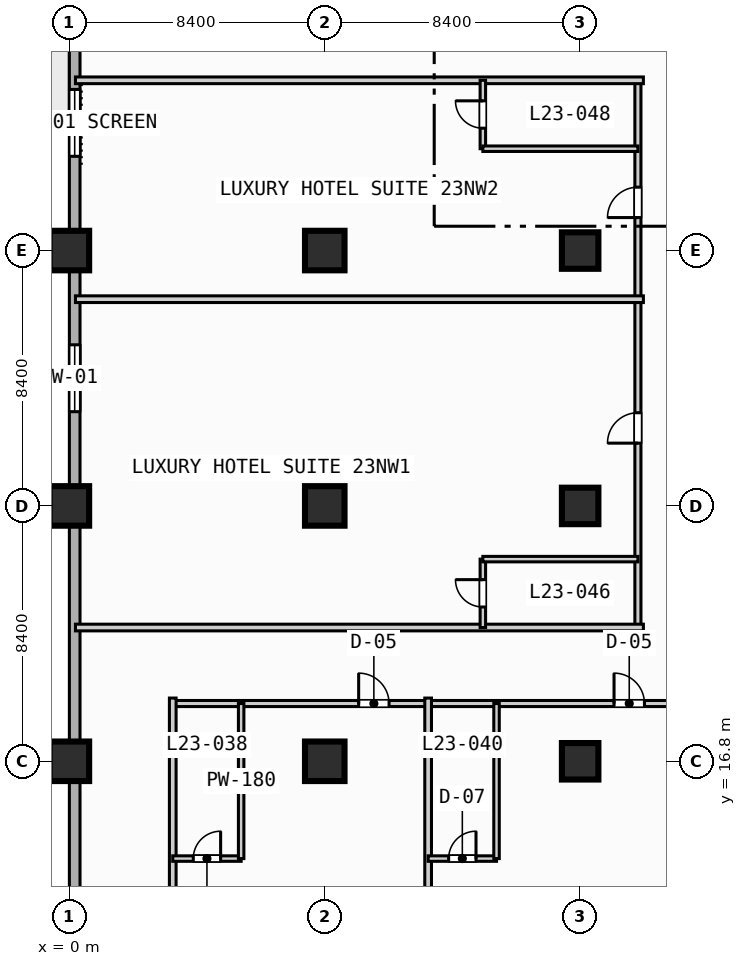
"""IFC4 building model, lengths in metres.
Left out: names, types, materials, properties, quantities, classifications, styles, units other than length and angle.
Written with IfcOpenShell. Run it as: python <this file> out.ifc"""

import sys

from ifc_helpers import new_model, si_unit, direction, frame, frame_2d, origin, origin_2d, place, context, subcontext, project, spatial, rectangle, extrude, element, fill, save


model = new_model("IFC4")
c1 = context("Model", 3, precision=1e-05, world=origin(), true_north=direction((0.0, 1.0)))
c2 = subcontext(c1, "Body", "Model", "MODEL_VIEW")
j1 = project(units=[si_unit("LENGTHUNIT", "METRE"), si_unit("PLANEANGLEUNIT", "RADIAN")], contexts=[c1])
p1 = place(None, origin())
s1 = spatial("IfcSite", under=j1, at=p1, CompositionType="ELEMENT")
p2 = place(p1, origin())
s2 = spatial("IfcBuilding", under=s1, at=p2, CompositionType="ELEMENT")
p3 = place(p2, frame((0.0, 0.0, 100.0)))
s3 = spatial("IfcBuildingStorey", under=s2, at=p3, CompositionType="ELEMENT", Elevation=100.0)
for number, where, z_axis, x_axis in (
    (1, (0.0, 16.8, 0.0), (0.0, 0.0, 1.0), (1.0, 0.0, 0.0)),
    (2, (0.0, 25.2, 0.0), (0.0, 0.0, 1.0), (1.0, 0.0, 0.0)),
    (3, (0.0, 33.6, 0.0), (0.0, 0.0, 1.0), (1.0, 0.0, 0.0)),
    (4, (8.4, 16.8, 0.0), (0.0, 0.0, 1.0), (1.0, 0.0, 0.0)),
    (5, (8.4, 25.2, 0.0), (0.0, 0.0, 1.0), (1.0, 0.0, 0.0)),
    (6, (8.4, 33.6, 0.0), (0.0, 0.0, 1.0), (1.0, 0.0, 0.0)),
):
    element("IfcColumn", number, at=place(p3, frame(where, z_axis=z_axis, x_axis=x_axis)), inside=s3, PredefinedType="COLUMN", context=c2, shape_type="SweptSolid", body=[
        extrude(rectangle(XDim=1.3, YDim=1.3, at=origin_2d()), origin(), (0.0, 0.0, 1.0), 3.8),
    ])
for number, where, z_axis, x_axis in (
    (7, (16.8, 16.8, 0.0), (0.0, 0.0, 1.0), (1.0, 0.0, 0.0)),
    (8, (16.8, 25.2, 0.0), (0.0, 0.0, 1.0), (1.0, 0.0, 0.0)),
    (9, (16.8, 33.6, 0.0), (0.0, 0.0, 1.0), (1.0, 0.0, 0.0)),
):
    element("IfcColumn", number, at=place(p3, frame(where, z_axis=z_axis, x_axis=x_axis)), inside=s3, PredefinedType="COLUMN", context=c2, shape_type="SweptSolid", body=[
        extrude(rectangle(XDim=1.2, YDim=1.2, at=origin_2d()), origin(), (0.0, 0.0, 1.0), 3.8),
    ])
p4 = place(p3, frame((0.175, 3.175, 0.0), z_axis=(0.0, 0.0, 1.0), x_axis=(0.0, 1.0, 0.0)))
e10 = element("IfcWall", 10, at=p4, inside=s3, PredefinedType="STANDARD", context=c2, shape_type="SweptSolid", body=[
    extrude(rectangle(XDim=86.05, YDim=0.35, at=frame_2d((43.025, 0.0))), origin(), (0.0, 0.0, 1.0), 3.55),
])
p5 = place(p4, frame((42.325, 0.0, 0.0)))
e11 = element("IfcOpeningElement", 11, at=p5, cuts=e10, PredefinedType="OPENING", context=c2, shape_type="SweptSolid", body=[
    extrude(rectangle(XDim=1.4, YDim=2.2, at=frame_2d((0.7, 1.1))), frame((0.0, 0.185, 0.0), z_axis=(0.0, -1.0, 0.0), x_axis=(1.0, 0.0, 0.0)), (0.0, 0.0, 1.0), 0.37),
])
p6 = place(p4, frame((25.125, 0.0, 0.85)))
e12 = element("IfcOpeningElement", 12, at=p6, cuts=e10, PredefinedType="OPENING", context=c2, shape_type="SweptSolid", body=[
    extrude(rectangle(XDim=2.2, YDim=1.8, at=frame_2d((1.1, 0.9))), frame((0.0, 0.185, 0.0), z_axis=(0.0, -1.0, 0.0), x_axis=(1.0, 0.0, 0.0)), (0.0, 0.0, 1.0), 0.37),
])
p7 = place(p4, frame((33.525, 0.0, 0.85)))
e13 = element("IfcOpeningElement", 13, at=p7, cuts=e10, PredefinedType="OPENING", context=c2, shape_type="SweptSolid", body=[
    extrude(rectangle(XDim=2.2, YDim=1.8, at=frame_2d((1.1, 0.9))), frame((0.0, 0.185, 0.0), z_axis=(0.0, -1.0, 0.0), x_axis=(1.0, 0.0, 0.0)), (0.0, 0.0, 1.0), 0.37),
])
p8 = place(p4, frame((58.725, 0.0, 0.85)))
e14 = element("IfcOpeningElement", 14, at=p8, cuts=e10, PredefinedType="OPENING", context=c2, shape_type="SweptSolid", body=[
    extrude(rectangle(XDim=2.2, YDim=1.8, at=frame_2d((1.1, 0.9))), frame((0.0, 0.185, 0.0), z_axis=(0.0, -1.0, 0.0), x_axis=(1.0, 0.0, 0.0)), (0.0, 0.0, 1.0), 0.37),
])
p9 = place(p4, frame((65.125, 0.0, 0.85)))
e15 = element("IfcOpeningElement", 15, at=p9, cuts=e10, PredefinedType="OPENING", context=c2, shape_type="SweptSolid", body=[
    extrude(rectangle(XDim=1.8, YDim=1.8, at=frame_2d((0.9, 0.9))), frame((0.0, 0.185, 0.0), z_axis=(0.0, -1.0, 0.0), x_axis=(1.0, 0.0, 0.0)), (0.0, 0.0, 1.0), 0.37),
])
p10 = place(p4, frame((73.275, 0.0, 0.85)))
e16 = element("IfcOpeningElement", 16, at=p10, cuts=e10, PredefinedType="OPENING", context=c2, shape_type="SweptSolid", body=[
    extrude(rectangle(XDim=1.8, YDim=1.8, at=frame_2d((0.9, 0.9))), frame((0.0, 0.185, 0.0), z_axis=(0.0, -1.0, 0.0), x_axis=(1.0, 0.0, 0.0)), (0.0, 0.0, 1.0), 0.37),
])
p11 = place(p4, frame((81.625, 0.0, 0.85)))
e17 = element("IfcOpeningElement", 17, at=p11, cuts=e10, PredefinedType="OPENING", context=c2, shape_type="SweptSolid", body=[
    extrude(rectangle(XDim=1.8, YDim=1.8, at=frame_2d((0.9, 0.9))), frame((0.0, 0.185, 0.0), z_axis=(0.0, -1.0, 0.0), x_axis=(1.0, 0.0, 0.0)), (0.0, 0.0, 1.0), 0.37),
])
p12 = place(p3, frame((3.4, 18.7, 0.0), z_axis=(0.0, 0.0, 1.0), x_axis=(1.0, 0.0, 0.0)))
e18 = element("IfcWall", 18, at=p12, inside=s3, PredefinedType="PARTITIONING", context=c2, shape_type="SweptSolid", body=[
    extrude(rectangle(XDim=35.8, YDim=0.2, at=frame_2d((17.9, 0.0))), origin(), (0.0, 0.0, 1.0), 3.55),
])
p13 = place(p12, frame((6.115, 0.0, 0.0)))
e19 = element("IfcOpeningElement", 19, at=p13, cuts=e18, PredefinedType="OPENING", context=c2, shape_type="SweptSolid", body=[
    extrude(rectangle(XDim=1.0, YDim=2.15, at=frame_2d((0.5, 1.075))), frame((0.0, 0.11, 0.0), z_axis=(0.0, -1.0, 0.0), x_axis=(1.0, 0.0, 0.0)), (0.0, 0.0, 1.0), 0.22),
])
p14 = place(p12, frame((14.515, 0.0, 0.0)))
e20 = element("IfcOpeningElement", 20, at=p14, cuts=e18, PredefinedType="OPENING", context=c2, shape_type="SweptSolid", body=[
    extrude(rectangle(XDim=1.0, YDim=2.15, at=frame_2d((0.5, 1.075))), frame((0.0, 0.11, 0.0), z_axis=(0.0, -1.0, 0.0), x_axis=(1.0, 0.0, 0.0)), (0.0, 0.0, 1.0), 0.22),
])
p15 = place(p12, frame((22.915, 0.0, 0.0)))
e21 = element("IfcOpeningElement", 21, at=p15, cuts=e18, PredefinedType="OPENING", context=c2, shape_type="SweptSolid", body=[
    extrude(rectangle(XDim=1.0, YDim=2.15, at=frame_2d((0.5, 1.075))), frame((0.0, 0.11, 0.0), z_axis=(0.0, -1.0, 0.0), x_axis=(1.0, 0.0, 0.0)), (0.0, 0.0, 1.0), 0.22),
])
p16 = place(p12, frame((31.165, 0.0, 0.0)))
e22 = element("IfcOpeningElement", 22, at=p16, cuts=e18, PredefinedType="OPENING", context=c2, shape_type="SweptSolid", body=[
    extrude(rectangle(XDim=1.0, YDim=2.15, at=frame_2d((0.5, 1.075))), frame((0.0, 0.11, 0.0), z_axis=(0.0, -1.0, 0.0), x_axis=(1.0, 0.0, 0.0)), (0.0, 0.0, 1.0), 0.22),
])
p17 = place(p3, frame((3.4, 0.2, 0.0), z_axis=(0.0, 0.0, 1.0), x_axis=(0.0, 1.0, 0.0)))
e23 = element("IfcWall", 23, at=p17, inside=s3, PredefinedType="PARTITIONING", context=c2, shape_type="SweptSolid", body=[
    extrude(rectangle(XDim=18.68, YDim=0.22, at=frame_2d((9.34, 0.0))), origin(), (0.0, 0.0, 1.0), 3.55),
])
p18 = place(p3, frame((3.4, 13.6, 0.0), z_axis=(0.0, 0.0, 1.0), x_axis=(1.0, 0.0, 0.0)))
e24 = element("IfcWall", 24, at=p18, inside=s3, PredefinedType="PLUMBINGWALL", context=c2, shape_type="SweptSolid", body=[
    extrude(rectangle(XDim=2.25, YDim=0.18, at=frame_2d((1.125, 0.0))), origin(), (0.0, 0.0, 1.0), 3.55),
])
p19 = place(p18, frame((0.675, 0.0, 0.0)))
e25 = element("IfcOpeningElement", 25, at=p19, cuts=e24, PredefinedType="OPENING", context=c2, shape_type="SweptSolid", body=[
    extrude(rectangle(XDim=0.9, YDim=2.1, at=frame_2d((0.45, 1.05))), frame((0.0, 0.1, 0.0), z_axis=(0.0, -1.0, 0.0), x_axis=(1.0, 0.0, 0.0)), (0.0, 0.0, 1.0), 0.2),
])
p20 = place(p3, frame((5.65, 13.6, 0.0), z_axis=(0.0, 0.0, 1.0), x_axis=(0.0, 1.0, 0.0)))
e26 = element("IfcWall", 26, at=p20, inside=s3, PredefinedType="PLUMBINGWALL", context=c2, shape_type="SweptSolid", body=[
    extrude(rectangle(XDim=5.1, YDim=0.18, at=frame_2d((2.55, 0.0))), origin(), (0.0, 0.0, 1.0), 3.55),
])
p21 = place(p3, frame((11.8, 0.2, 0.0), z_axis=(0.0, 0.0, 1.0), x_axis=(0.0, 1.0, 0.0)))
e27 = element("IfcWall", 27, at=p21, inside=s3, PredefinedType="PARTITIONING", context=c2, shape_type="SweptSolid", body=[
    extrude(rectangle(XDim=18.68, YDim=0.22, at=frame_2d((9.34, 0.0))), origin(), (0.0, 0.0, 1.0), 3.55),
])
p22 = place(p3, frame((11.8, 13.6, 0.0), z_axis=(0.0, 0.0, 1.0), x_axis=(1.0, 0.0, 0.0)))
e28 = element("IfcWall", 28, at=p22, inside=s3, PredefinedType="PLUMBINGWALL", context=c2, shape_type="SweptSolid", body=[
    extrude(rectangle(XDim=2.25, YDim=0.18, at=frame_2d((1.125, 0.0))), origin(), (0.0, 0.0, 1.0), 3.55),
])
p23 = place(p22, frame((0.675, 0.0, 0.0)))
e29 = element("IfcOpeningElement", 29, at=p23, cuts=e28, PredefinedType="OPENING", context=c2, shape_type="SweptSolid", body=[
    extrude(rectangle(XDim=0.9, YDim=2.1, at=frame_2d((0.45, 1.05))), frame((0.0, 0.1, 0.0), z_axis=(0.0, -1.0, 0.0), x_axis=(1.0, 0.0, 0.0)), (0.0, 0.0, 1.0), 0.2),
])
p24 = place(p3, frame((14.05, 13.6, 0.0), z_axis=(0.0, 0.0, 1.0), x_axis=(0.0, 1.0, 0.0)))
e30 = element("IfcWall", 30, at=p24, inside=s3, PredefinedType="PLUMBINGWALL", context=c2, shape_type="SweptSolid", body=[
    extrude(rectangle(XDim=5.1, YDim=0.18, at=frame_2d((2.55, 0.0))), origin(), (0.0, 0.0, 1.0), 3.55),
])
p25 = place(p3, frame((18.7, 21.2, 0.0), z_axis=(0.0, 0.0, 1.0), x_axis=(0.0, 1.0, 0.0)))
e31 = element("IfcWall", 31, at=p25, inside=s3, PredefinedType="PARTITIONING", context=c2, shape_type="SweptSolid", body=[
    extrude(rectangle(XDim=18.0, YDim=0.2, at=frame_2d((9.0, 0.0))), origin(), (0.0, 0.0, 1.0), 3.55),
])
p26 = place(p25, frame((6.065, 0.0, 0.0)))
e32 = element("IfcOpeningElement", 32, at=p26, cuts=e31, PredefinedType="OPENING", context=c2, shape_type="SweptSolid", body=[
    extrude(rectangle(XDim=1.0, YDim=2.15, at=frame_2d((0.5, 1.075))), frame((0.0, 0.11, 0.0), z_axis=(0.0, -1.0, 0.0), x_axis=(1.0, 0.0, 0.0)), (0.0, 0.0, 1.0), 0.22),
])
p27 = place(p25, frame((13.485, 0.0, 0.0)))
e33 = element("IfcOpeningElement", 33, at=p27, cuts=e31, PredefinedType="OPENING", context=c2, shape_type="SweptSolid", body=[
    extrude(rectangle(XDim=1.0, YDim=2.15, at=frame_2d((0.5, 1.075))), frame((0.0, 0.11, 0.0), z_axis=(0.0, -1.0, 0.0), x_axis=(1.0, 0.0, 0.0)), (0.0, 0.0, 1.0), 0.22),
])
p28 = place(p3, frame((0.2, 21.2, 0.0), z_axis=(0.0, 0.0, 1.0), x_axis=(1.0, 0.0, 0.0)))
e34 = element("IfcWall", 34, at=p28, inside=s3, PredefinedType="PARTITIONING", context=c2, shape_type="SweptSolid", body=[
    extrude(rectangle(XDim=18.68, YDim=0.22, at=frame_2d((9.34, 0.0))), origin(), (0.0, 0.0, 1.0), 3.55),
])
p29 = place(p3, frame((13.6, 21.2, 0.0), z_axis=(0.0, 0.0, 1.0), x_axis=(0.0, 1.0, 0.0)))
e35 = element("IfcWall", 35, at=p29, inside=s3, PredefinedType="PLUMBINGWALL", context=c2, shape_type="SweptSolid", body=[
    extrude(rectangle(XDim=2.25, YDim=0.18, at=frame_2d((1.125, 0.0))), origin(), (0.0, 0.0, 1.0), 3.55),
])
p30 = place(p29, frame((0.675, 0.0, 0.0)))
e36 = element("IfcOpeningElement", 36, at=p30, cuts=e35, PredefinedType="OPENING", context=c2, shape_type="SweptSolid", body=[
    extrude(rectangle(XDim=0.9, YDim=2.1, at=frame_2d((0.45, 1.05))), frame((0.0, 0.1, 0.0), z_axis=(0.0, -1.0, 0.0), x_axis=(1.0, 0.0, 0.0)), (0.0, 0.0, 1.0), 0.2),
])
p31 = place(p3, frame((13.6, 23.45, 0.0), z_axis=(0.0, 0.0, 1.0), x_axis=(1.0, 0.0, 0.0)))
e37 = element("IfcWall", 37, at=p31, inside=s3, PredefinedType="PLUMBINGWALL", context=c2, shape_type="SweptSolid", body=[
    extrude(rectangle(XDim=5.1, YDim=0.18, at=frame_2d((2.55, 0.0))), origin(), (0.0, 0.0, 1.0), 3.55),
])
for number, where, z_axis, x_axis in (
    (38, (0.2, 32.0, 0.0), (0.0, 0.0, 1.0), (1.0, 0.0, 0.0)),
    (39, (0.2, 39.2, 0.0), (0.0, 0.0, 1.0), (1.0, 0.0, 0.0)),
):
    element("IfcWall", number, at=place(p3, frame(where, z_axis=z_axis, x_axis=x_axis)), inside=s3, PredefinedType="PARTITIONING", context=c2, shape_type="SweptSolid", body=[
        extrude(rectangle(XDim=18.68, YDim=0.22, at=frame_2d((9.34, 0.0))), origin(), (0.0, 0.0, 1.0), 3.55),
    ])
p32 = place(p3, frame((13.6, 36.95, 0.0), z_axis=(0.0, 0.0, 1.0), x_axis=(0.0, 1.0, 0.0)))
e40 = element("IfcWall", 40, at=p32, inside=s3, PredefinedType="PLUMBINGWALL", context=c2, shape_type="SweptSolid", body=[
    extrude(rectangle(XDim=2.25, YDim=0.18, at=frame_2d((1.125, 0.0))), origin(), (0.0, 0.0, 1.0), 3.55),
])
p33 = place(p32, frame((0.675, 0.0, 0.0)))
e41 = element("IfcOpeningElement", 41, at=p33, cuts=e40, PredefinedType="OPENING", context=c2, shape_type="SweptSolid", body=[
    extrude(rectangle(XDim=0.9, YDim=2.1, at=frame_2d((0.45, 1.05))), frame((0.0, 0.1, 0.0), z_axis=(0.0, -1.0, 0.0), x_axis=(1.0, 0.0, 0.0)), (0.0, 0.0, 1.0), 0.2),
])
p34 = place(p3, frame((13.6, 36.95, 0.0), z_axis=(0.0, 0.0, 1.0), x_axis=(1.0, 0.0, 0.0)))
e42 = element("IfcWall", 42, at=p34, inside=s3, PredefinedType="PLUMBINGWALL", context=c2, shape_type="SweptSolid", body=[
    extrude(rectangle(XDim=5.1, YDim=0.18, at=frame_2d((2.55, 0.0))), origin(), (0.0, 0.0, 1.0), 3.55),
])
p35 = place(p6, origin())
e43 = element("IfcWindow", 43, at=p35, inside=s3, PartitioningType="SINGLE_PANEL", PredefinedType="WINDOW", context=c2, shape_type="SweptSolid", body=[
    extrude(rectangle(XDim=2.2, YDim=1.8, at=frame_2d((1.1, 0.9))), frame((0.0, 0.03, 0.0), z_axis=(0.0, -1.0, 0.0), x_axis=(1.0, 0.0, 0.0)), (0.0, 0.0, 1.0), 0.06),
])
fill(e12, e43)
p36 = place(p7, origin())
e44 = element("IfcWindow", 44, at=p36, inside=s3, PartitioningType="SINGLE_PANEL", PredefinedType="WINDOW", context=c2, shape_type="SweptSolid", body=[
    extrude(rectangle(XDim=2.2, YDim=1.8, at=frame_2d((1.1, 0.9))), frame((0.0, 0.03, 0.0), z_axis=(0.0, -1.0, 0.0), x_axis=(1.0, 0.0, 0.0)), (0.0, 0.0, 1.0), 0.06),
])
fill(e13, e44)
p37 = place(p13, origin())
e45 = element("IfcDoor", 45, at=p37, inside=s3, OperationType="SINGLE_SWING_LEFT", PredefinedType="DOOR", context=c2, shape_type="SweptSolid", body=[
    extrude(rectangle(XDim=1.0, YDim=2.15, at=frame_2d((0.5, 1.075))), frame((0.0, 0.025, 0.0), z_axis=(0.0, -1.0, 0.0), x_axis=(1.0, 0.0, 0.0)), (0.0, 0.0, 1.0), 0.05),
])
fill(e19, e45)
p38 = place(p14, origin())
e46 = element("IfcDoor", 46, at=p38, inside=s3, OperationType="SINGLE_SWING_LEFT", PredefinedType="DOOR", context=c2, shape_type="SweptSolid", body=[
    extrude(rectangle(XDim=1.0, YDim=2.15, at=frame_2d((0.5, 1.075))), frame((0.0, 0.025, 0.0), z_axis=(0.0, -1.0, 0.0), x_axis=(1.0, 0.0, 0.0)), (0.0, 0.0, 1.0), 0.05),
])
fill(e20, e46)
p39 = place(p19, origin())
e47 = element("IfcDoor", 47, at=p39, inside=s3, OperationType="SINGLE_SWING_RIGHT", PredefinedType="DOOR", context=c2, shape_type="SweptSolid", body=[
    extrude(rectangle(XDim=0.9, YDim=2.1, at=frame_2d((0.45, 1.05))), frame((0.0, 0.025, 0.0), z_axis=(0.0, -1.0, 0.0), x_axis=(1.0, 0.0, 0.0)), (0.0, 0.0, 1.0), 0.05),
])
fill(e25, e47)
p40 = place(p23, origin())
e48 = element("IfcDoor", 48, at=p40, inside=s3, OperationType="SINGLE_SWING_RIGHT", PredefinedType="DOOR", context=c2, shape_type="SweptSolid", body=[
    extrude(rectangle(XDim=0.9, YDim=2.1, at=frame_2d((0.45, 1.05))), frame((0.0, 0.025, 0.0), z_axis=(0.0, -1.0, 0.0), x_axis=(1.0, 0.0, 0.0)), (0.0, 0.0, 1.0), 0.05),
])
fill(e29, e48)
p41 = place(p26, origin())
e49 = element("IfcDoor", 49, at=p41, inside=s3, OperationType="SINGLE_SWING_LEFT", PredefinedType="DOOR", context=c2, shape_type="SweptSolid", body=[
    extrude(rectangle(XDim=1.0, YDim=2.15, at=frame_2d((0.5, 1.075))), frame((0.0, 0.025, 0.0), z_axis=(0.0, -1.0, 0.0), x_axis=(1.0, 0.0, 0.0)), (0.0, 0.0, 1.0), 0.05),
])
fill(e32, e49)
p42 = place(p27, origin())
e50 = element("IfcDoor", 50, at=p42, inside=s3, OperationType="SINGLE_SWING_LEFT", PredefinedType="DOOR", context=c2, shape_type="SweptSolid", body=[
    extrude(rectangle(XDim=1.0, YDim=2.15, at=frame_2d((0.5, 1.075))), frame((0.0, 0.025, 0.0), z_axis=(0.0, -1.0, 0.0), x_axis=(1.0, 0.0, 0.0)), (0.0, 0.0, 1.0), 0.05),
])
fill(e33, e50)
p43 = place(p30, origin())
e51 = element("IfcDoor", 51, at=p43, inside=s3, OperationType="SINGLE_SWING_RIGHT", PredefinedType="DOOR", context=c2, shape_type="SweptSolid", body=[
    extrude(rectangle(XDim=0.9, YDim=2.1, at=frame_2d((0.45, 1.05))), frame((0.0, 0.025, 0.0), z_axis=(0.0, -1.0, 0.0), x_axis=(1.0, 0.0, 0.0)), (0.0, 0.0, 1.0), 0.05),
])
fill(e36, e51)
p44 = place(p33, origin())
e52 = element("IfcDoor", 52, at=p44, inside=s3, OperationType="SINGLE_SWING_RIGHT", PredefinedType="DOOR", context=c2, shape_type="SweptSolid", body=[
    extrude(rectangle(XDim=0.9, YDim=2.1, at=frame_2d((0.45, 1.05))), frame((0.0, 0.025, 0.0), z_axis=(0.0, -1.0, 0.0), x_axis=(1.0, 0.0, 0.0)), (0.0, 0.0, 1.0), 0.05),
])
fill(e41, e52)
save(model, sys.argv[1])
